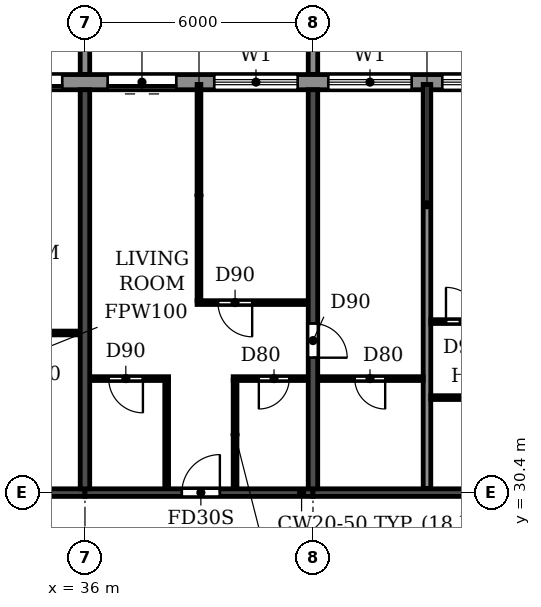
"""IFC4 building model, lengths in metres.
Left out: names, types, materials, properties, quantities, classifications, styles, units other than length and angle.
Written with IfcOpenShell. Run it as: python <this file> out.ifc"""

import sys

from ifc_helpers import new_model, si_unit, direction, frame, frame_2d, origin, place, context, subcontext, project, spatial, polyline, rectangle, outline, extrude, source, transform, mapped, element, fill, save


model = new_model("IFC4")
c1 = context("Model", 3, precision=1e-05, world=origin(), true_north=direction((0.0, 1.0)))
c2 = subcontext(c1, "Body", "Model", "MODEL_VIEW")
j1 = project(units=[si_unit("LENGTHUNIT", "METRE"), si_unit("PLANEANGLEUNIT", "RADIAN")], contexts=[c1])
p1 = place(None, origin())
s1 = spatial("IfcSite", under=j1, at=p1, CompositionType="ELEMENT")
p2 = place(p1, origin())
s2 = spatial("IfcBuilding", under=s1, at=p2, CompositionType="ELEMENT")
p3 = place(p2, frame((0.0, 0.0, 201.6)))
s3 = spatial("IfcBuildingStorey", under=s2, at=p3, CompositionType="ELEMENT", Elevation=201.6)
p4 = place(p3, frame((36.0, 30.5, 0.0), z_axis=(0.0, 0.0, 1.0), x_axis=(0.0, 1.0, 0.0)))
e1 = element("IfcWall", 1, at=p4, inside=s3, PredefinedType="SHEAR", context=c2, shape_type="SweptSolid", body=[
    extrude(rectangle(XDim=10.5, YDim=0.25, at=frame_2d((5.25, 0.0))), origin(), (0.0, 0.0, 1.0), 3.08),
])
p5 = place(p3, frame((42.0, 30.5, 0.0), z_axis=(0.0, 0.0, 1.0), x_axis=(0.0, 1.0, 0.0)))
e2 = element("IfcWall", 2, at=p5, inside=s3, PredefinedType="SHEAR", context=c2, shape_type="SweptSolid", body=[
    extrude(rectangle(XDim=10.5, YDim=0.25, at=frame_2d((5.25, 0.0))), origin(), (0.0, 0.0, 1.0), 3.08),
])
p6 = place(p5, frame((3.45, 0.0, 0.0)))
e3 = element("IfcOpeningElement", 3, at=p6, cuts=e2, PredefinedType="OPENING", context=c2, shape_type="SweptSolid", body=[
    extrude(rectangle(XDim=0.9, YDim=2.1, at=frame_2d((0.45, 1.05))), frame((0.0, 0.135, 0.0), z_axis=(0.0, -1.0, 0.0), x_axis=(1.0, 0.0, 0.0)), (0.0, 0.0, 1.0), 0.27),
])
p7 = place(p3, frame((30.0, 30.4, 0.0), z_axis=(0.0, 0.0, 1.0), x_axis=(1.0, 0.0, 0.0)))
e4 = element("IfcWall", 4, at=p7, inside=s3, PredefinedType="SHEAR", context=c2, shape_type="SweptSolid", body=[
    extrude(rectangle(XDim=6.0, YDim=0.2, at=frame_2d((3.0, 0.0))), origin(), (0.0, 0.0, 1.0), 2.48),
])
p8 = place(p7, frame((2.45, 0.0, 0.0)))
e5 = element("IfcOpeningElement", 5, at=p8, cuts=e4, PredefinedType="OPENING", context=c2, shape_type="SweptSolid", body=[
    extrude(rectangle(XDim=1.0, YDim=2.1, at=frame_2d((0.5, 1.05))), frame((0.0, 0.11, 0.0), z_axis=(0.0, -1.0, 0.0), x_axis=(1.0, 0.0, 0.0)), (0.0, 0.0, 1.0), 0.22),
])
p9 = place(p3, frame((36.0, 30.4, 0.0), z_axis=(0.0, 0.0, 1.0), x_axis=(1.0, 0.0, 0.0)))
e6 = element("IfcWall", 6, at=p9, inside=s3, PredefinedType="SHEAR", context=c2, shape_type="SweptSolid", body=[
    extrude(rectangle(XDim=6.0, YDim=0.2, at=frame_2d((3.0, 0.0))), origin(), (0.0, 0.0, 1.0), 2.48),
])
p10 = place(p9, frame((2.55, 0.0, 0.0)))
e7 = element("IfcOpeningElement", 7, at=p10, cuts=e6, PredefinedType="OPENING", context=c2, shape_type="SweptSolid", body=[
    extrude(rectangle(XDim=1.0, YDim=2.1, at=frame_2d((0.5, 1.05))), frame((0.0, 0.11, 0.0), z_axis=(0.0, -1.0, 0.0), x_axis=(1.0, 0.0, 0.0)), (0.0, 0.0, 1.0), 0.22),
])
p11 = place(p3, frame((42.0, 30.4, 0.0), z_axis=(0.0, 0.0, 1.0), x_axis=(1.0, 0.0, 0.0)))
e8 = element("IfcWall", 8, at=p11, inside=s3, PredefinedType="SHEAR", context=c2, shape_type="SweptSolid", body=[
    extrude(rectangle(XDim=6.0, YDim=0.2, at=frame_2d((3.0, 0.0))), origin(), (0.0, 0.0, 1.0), 2.48),
])
p12 = place(p3, frame((79.317, 41.2, 0.0), z_axis=(0.0, 0.0, 1.0), x_axis=(-1.0, 0.0, 0.0)))
e9 = element("IfcWall", 9, at=p12, inside=s3, PredefinedType="STANDARD", context=c2, shape_type="SweptSolid", body=[
    extrude(rectangle(XDim=56.634, YDim=0.4, at=frame_2d((28.317, 0.0))), origin(), (0.0, 0.0, 1.0), 3.08),
])
p13 = place(p12, frame((52.717, 0.0, 0.9)))
e10 = element("IfcOpeningElement", 10, at=p13, cuts=e9, PredefinedType="OPENING", context=c2, shape_type="SweptSolid", body=[
    extrude(rectangle(XDim=2.2, YDim=1.5, at=frame_2d((1.1, 0.75))), frame((0.0, 0.21, 0.0), z_axis=(0.0, -1.0, 0.0), x_axis=(1.0, 0.0, 0.0)), (0.0, 0.0, 1.0), 0.42),
])
p14 = place(p12, frame((49.917, 0.0, 0.0)))
e11 = element("IfcOpeningElement", 11, at=p14, cuts=e9, PredefinedType="OPENING", context=c2, shape_type="SweptSolid", body=[
    extrude(rectangle(XDim=1.8, YDim=2.4, at=frame_2d((0.9, 1.2))), frame((0.0, 0.21, 0.0), z_axis=(0.0, -1.0, 0.0), x_axis=(1.0, 0.0, 0.0)), (0.0, 0.0, 1.0), 0.42),
])
p15 = place(p12, frame((46.717, 0.0, 0.9)))
e12 = element("IfcOpeningElement", 12, at=p15, cuts=e9, PredefinedType="OPENING", context=c2, shape_type="SweptSolid", body=[
    extrude(rectangle(XDim=2.2, YDim=1.5, at=frame_2d((1.1, 0.75))), frame((0.0, 0.21, 0.0), z_axis=(0.0, -1.0, 0.0), x_axis=(1.0, 0.0, 0.0)), (0.0, 0.0, 1.0), 0.42),
])
p16 = place(p12, frame((43.917, 0.0, 0.0)))
e13 = element("IfcOpeningElement", 13, at=p16, cuts=e9, PredefinedType="OPENING", context=c2, shape_type="SweptSolid", body=[
    extrude(rectangle(XDim=1.8, YDim=2.4, at=frame_2d((0.9, 1.2))), frame((0.0, 0.21, 0.0), z_axis=(0.0, -1.0, 0.0), x_axis=(1.0, 0.0, 0.0)), (0.0, 0.0, 1.0), 0.42),
])
p17 = place(p12, frame((40.917, 0.0, 0.0)))
e14 = element("IfcOpeningElement", 14, at=p17, cuts=e9, PredefinedType="OPENING", context=c2, shape_type="SweptSolid", body=[
    extrude(rectangle(XDim=1.8, YDim=2.4, at=frame_2d((0.9, 1.2))), frame((0.0, 0.21, 0.0), z_axis=(0.0, -1.0, 0.0), x_axis=(1.0, 0.0, 0.0)), (0.0, 0.0, 1.0), 0.42),
])
p18 = place(p12, frame((37.717, 0.0, 0.9)))
e15 = element("IfcOpeningElement", 15, at=p18, cuts=e9, PredefinedType="OPENING", context=c2, shape_type="SweptSolid", body=[
    extrude(rectangle(XDim=2.2, YDim=1.5, at=frame_2d((1.1, 0.75))), frame((0.0, 0.21, 0.0), z_axis=(0.0, -1.0, 0.0), x_axis=(1.0, 0.0, 0.0)), (0.0, 0.0, 1.0), 0.42),
])
p19 = place(p12, frame((34.717, 0.0, 0.9)))
e16 = element("IfcOpeningElement", 16, at=p19, cuts=e9, PredefinedType="OPENING", context=c2, shape_type="SweptSolid", body=[
    extrude(rectangle(XDim=2.2, YDim=1.5, at=frame_2d((1.1, 0.75))), frame((0.0, 0.21, 0.0), z_axis=(0.0, -1.0, 0.0), x_axis=(1.0, 0.0, 0.0)), (0.0, 0.0, 1.0), 0.42),
])
p20 = place(p12, frame((31.717, 0.0, 0.9)))
e17 = element("IfcOpeningElement", 17, at=p20, cuts=e9, PredefinedType="OPENING", context=c2, shape_type="SweptSolid", body=[
    extrude(rectangle(XDim=2.2, YDim=1.5, at=frame_2d((1.1, 0.75))), frame((0.0, 0.21, 0.0), z_axis=(0.0, -1.0, 0.0), x_axis=(1.0, 0.0, 0.0)), (0.0, 0.0, 1.0), 0.42),
])
p21 = place(p12, frame((28.717, 0.0, 0.9)))
e18 = element("IfcOpeningElement", 18, at=p21, cuts=e9, PredefinedType="OPENING", context=c2, shape_type="SweptSolid", body=[
    extrude(rectangle(XDim=2.2, YDim=1.5, at=frame_2d((1.1, 0.75))), frame((0.0, 0.21, 0.0), z_axis=(0.0, -1.0, 0.0), x_axis=(1.0, 0.0, 0.0)), (0.0, 0.0, 1.0), 0.42),
])
p22 = place(p12, frame((25.917, 0.0, 0.0)))
e19 = element("IfcOpeningElement", 19, at=p22, cuts=e9, PredefinedType="OPENING", context=c2, shape_type="SweptSolid", body=[
    extrude(rectangle(XDim=1.8, YDim=2.4, at=frame_2d((0.9, 1.2))), frame((0.0, 0.21, 0.0), z_axis=(0.0, -1.0, 0.0), x_axis=(1.0, 0.0, 0.0)), (0.0, 0.0, 1.0), 0.42),
])
p23 = place(p12, frame((22.717, 0.0, 0.9)))
e20 = element("IfcOpeningElement", 20, at=p23, cuts=e9, PredefinedType="OPENING", context=c2, shape_type="SweptSolid", body=[
    extrude(rectangle(XDim=2.2, YDim=1.5, at=frame_2d((1.1, 0.75))), frame((0.0, 0.21, 0.0), z_axis=(0.0, -1.0, 0.0), x_axis=(1.0, 0.0, 0.0)), (0.0, 0.0, 1.0), 0.42),
])
p24 = place(p12, frame((19.717, 0.0, 0.9)))
e21 = element("IfcOpeningElement", 21, at=p24, cuts=e9, PredefinedType="OPENING", context=c2, shape_type="SweptSolid", body=[
    extrude(rectangle(XDim=2.2, YDim=1.5, at=frame_2d((1.1, 0.75))), frame((0.0, 0.21, 0.0), z_axis=(0.0, -1.0, 0.0), x_axis=(1.0, 0.0, 0.0)), (0.0, 0.0, 1.0), 0.42),
])
p25 = place(p12, frame((16.917, 0.0, 0.0)))
e22 = element("IfcOpeningElement", 22, at=p25, cuts=e9, PredefinedType="OPENING", context=c2, shape_type="SweptSolid", body=[
    extrude(rectangle(XDim=1.8, YDim=2.4, at=frame_2d((0.9, 1.2))), frame((0.0, 0.21, 0.0), z_axis=(0.0, -1.0, 0.0), x_axis=(1.0, 0.0, 0.0)), (0.0, 0.0, 1.0), 0.42),
])
p26 = place(p12, frame((13.717, 0.0, 0.9)))
e23 = element("IfcOpeningElement", 23, at=p26, cuts=e9, PredefinedType="OPENING", context=c2, shape_type="SweptSolid", body=[
    extrude(rectangle(XDim=2.2, YDim=1.5, at=frame_2d((1.1, 0.75))), frame((0.0, 0.21, 0.0), z_axis=(0.0, -1.0, 0.0), x_axis=(1.0, 0.0, 0.0)), (0.0, 0.0, 1.0), 0.42),
])
p27 = place(p12, frame((10.717, 0.0, 0.9)))
e24 = element("IfcOpeningElement", 24, at=p27, cuts=e9, PredefinedType="OPENING", context=c2, shape_type="SweptSolid", body=[
    extrude(rectangle(XDim=2.2, YDim=1.5, at=frame_2d((1.1, 0.75))), frame((0.0, 0.21, 0.0), z_axis=(0.0, -1.0, 0.0), x_axis=(1.0, 0.0, 0.0)), (0.0, 0.0, 1.0), 0.42),
])
p28 = place(p12, frame((7.717, 0.0, 0.9)))
e25 = element("IfcOpeningElement", 25, at=p28, cuts=e9, PredefinedType="OPENING", context=c2, shape_type="SweptSolid", body=[
    extrude(rectangle(XDim=2.2, YDim=1.5, at=frame_2d((1.1, 0.75))), frame((0.0, 0.21, 0.0), z_axis=(0.0, -1.0, 0.0), x_axis=(1.0, 0.0, 0.0)), (0.0, 0.0, 1.0), 0.42),
])
p29 = place(p12, frame((4.917, 0.0, 0.0)))
e26 = element("IfcOpeningElement", 26, at=p29, cuts=e9, PredefinedType="OPENING", context=c2, shape_type="SweptSolid", body=[
    extrude(rectangle(XDim=1.8, YDim=2.4, at=frame_2d((0.9, 1.2))), frame((0.0, 0.21, 0.0), z_axis=(0.0, -1.0, 0.0), x_axis=(1.0, 0.0, 0.0)), (0.0, 0.0, 1.0), 0.42),
])
p30 = place(p12, frame((1.717, 0.0, 0.9)))
e27 = element("IfcOpeningElement", 27, at=p30, cuts=e9, PredefinedType="OPENING", context=c2, shape_type="SweptSolid", body=[
    extrude(rectangle(XDim=2.2, YDim=1.5, at=frame_2d((1.1, 0.75))), frame((0.0, 0.21, 0.0), z_axis=(0.0, -1.0, 0.0), x_axis=(1.0, 0.0, 0.0)), (0.0, 0.0, 1.0), 0.42),
])
m1 = source(origin(), c2, "Body", "SweptSolid", [
    extrude(outline(polyline([(0.0, 0.0), (0.25, 0.0), (0.25, 3.1), (0.0, 3.1), (0.0, 0.0)])), origin(), (0.0, 0.0, 1.0), 3.1),
])
for number, where in (
    (28, (35.875, 41.4, 0.0)),
    (29, (41.875, 41.4, 0.0)),
):
    element("IfcWall", number, at=place(p3, frame(where)), inside=s3, PredefinedType="STANDARD", context=c2, shape_type="MappedRepresentation", body=[
        mapped(m1, transform((0.0, 0.0, 0.0))),
    ])
p31 = place(p3, frame((45.0, 30.51, 0.0), z_axis=(0.0, 0.0, 1.0), x_axis=(0.0, 1.0, 0.0)))
e30 = element("IfcWall", 30, at=p31, inside=s3, PredefinedType="PARTITIONING", context=c2, shape_type="SweptSolid", body=[
    extrude(rectangle(XDim=10.63, YDim=0.2, at=frame_2d((5.315, 0.0))), origin(), (0.0, 0.0, 1.0), 3.08),
])
p32 = place(p3, frame((45.1, 32.9, 0.0), z_axis=(0.0, 0.0, 1.0), x_axis=(1.0, 0.0, 0.0)))
e31 = element("IfcWall", 31, at=p32, inside=s3, PredefinedType="PARTITIONING", context=c2, shape_type="SweptSolid", body=[
    extrude(rectangle(XDim=2.765, YDim=0.1, at=frame_2d((1.382, 0.0))), origin(), (0.0, 0.0, 1.0), 3.08),
])
p33 = place(p32, frame((1.0, 0.0, 0.0)))
e32 = element("IfcOpeningElement", 32, at=p33, cuts=e31, PredefinedType="OPENING", context=c2, shape_type="SweptSolid", body=[
    extrude(rectangle(XDim=0.8, YDim=2.1, at=frame_2d((0.4, 1.05))), frame((0.0, 0.06, 0.0), z_axis=(0.0, -1.0, 0.0), x_axis=(1.0, 0.0, 0.0)), (0.0, 0.0, 1.0), 0.12),
])
p34 = place(p3, frame((36.135, 33.4, 0.0), z_axis=(0.0, 0.0, 1.0), x_axis=(1.0, 0.0, 0.0)))
e33 = element("IfcWall", 33, at=p34, inside=s3, PredefinedType="PARTITIONING", context=c2, shape_type="SweptSolid", body=[
    extrude(rectangle(XDim=2.065, YDim=0.1, at=frame_2d((1.032, 0.0))), origin(), (0.0, 0.0, 1.0), 3.08),
])
p35 = place(p34, frame((0.49, 0.0, 0.0)))
e34 = element("IfcOpeningElement", 34, at=p35, cuts=e33, PredefinedType="OPENING", context=c2, shape_type="SweptSolid", body=[
    extrude(rectangle(XDim=0.9, YDim=2.1, at=frame_2d((0.45, 1.05))), frame((0.0, 0.06, 0.0), z_axis=(0.0, -1.0, 0.0), x_axis=(1.0, 0.0, 0.0)), (0.0, 0.0, 1.0), 0.12),
])
p36 = place(p3, frame((39.9, 33.4, 0.0), z_axis=(0.0, 0.0, 1.0), x_axis=(1.0, 0.0, 0.0)))
e35 = element("IfcWall", 35, at=p36, inside=s3, PredefinedType="PARTITIONING", context=c2, shape_type="SweptSolid", body=[
    extrude(rectangle(XDim=1.965, YDim=0.1, at=frame_2d((0.982, 0.0))), origin(), (0.0, 0.0, 1.0), 3.08),
])
p37 = place(p36, frame((0.675, 0.0, 0.0)))
e36 = element("IfcOpeningElement", 36, at=p37, cuts=e35, PredefinedType="OPENING", context=c2, shape_type="SweptSolid", body=[
    extrude(rectangle(XDim=0.8, YDim=2.1, at=frame_2d((0.4, 1.05))), frame((0.0, 0.06, 0.0), z_axis=(0.0, -1.0, 0.0), x_axis=(1.0, 0.0, 0.0)), (0.0, 0.0, 1.0), 0.12),
])
p38 = place(p3, frame((42.135, 33.4, 0.0), z_axis=(0.0, 0.0, 1.0), x_axis=(1.0, 0.0, 0.0)))
e37 = element("IfcWall", 37, at=p38, inside=s3, PredefinedType="PARTITIONING", context=c2, shape_type="SweptSolid", body=[
    extrude(rectangle(XDim=2.765, YDim=0.1, at=frame_2d((1.382, 0.0))), origin(), (0.0, 0.0, 1.0), 3.08),
])
p39 = place(p38, frame((0.965, 0.0, 0.0)))
e38 = element("IfcOpeningElement", 38, at=p39, cuts=e37, PredefinedType="OPENING", context=c2, shape_type="SweptSolid", body=[
    extrude(rectangle(XDim=0.8, YDim=2.1, at=frame_2d((0.4, 1.05))), frame((0.0, 0.06, 0.0), z_axis=(0.0, -1.0, 0.0), x_axis=(1.0, 0.0, 0.0)), (0.0, 0.0, 1.0), 0.12),
])
p40 = place(p3, frame((33.8, 34.6, 0.0), z_axis=(0.0, 0.0, 1.0), x_axis=(1.0, 0.0, 0.0)))
e39 = element("IfcWall", 39, at=p40, inside=s3, PredefinedType="PARTITIONING", context=c2, shape_type="SweptSolid", body=[
    extrude(rectangle(XDim=2.065, YDim=0.1, at=frame_2d((1.032, 0.0))), origin(), (0.0, 0.0, 1.0), 3.08),
])
p41 = place(p3, frame((45.1, 34.9, 0.0), z_axis=(0.0, 0.0, 1.0), x_axis=(1.0, 0.0, 0.0)))
e40 = element("IfcWall", 40, at=p41, inside=s3, PredefinedType="PARTITIONING", context=c2, shape_type="SweptSolid", body=[
    extrude(rectangle(XDim=2.765, YDim=0.1, at=frame_2d((1.382, 0.0))), origin(), (0.0, 0.0, 1.0), 3.08),
])
p42 = place(p41, frame((0.4, 0.0, 0.0)))
e41 = element("IfcOpeningElement", 41, at=p42, cuts=e40, PredefinedType="OPENING", context=c2, shape_type="SweptSolid", body=[
    extrude(rectangle(XDim=0.9, YDim=2.1, at=frame_2d((0.45, 1.05))), frame((0.0, 0.06, 0.0), z_axis=(0.0, -1.0, 0.0), x_axis=(1.0, 0.0, 0.0)), (0.0, 0.0, 1.0), 0.12),
])
p43 = place(p3, frame((38.95, 35.4, 0.0), z_axis=(0.0, 0.0, 1.0), x_axis=(1.0, 0.0, 0.0)))
e42 = element("IfcWall", 42, at=p43, inside=s3, PredefinedType="PARTITIONING", context=c2, shape_type="SweptSolid", body=[
    extrude(rectangle(XDim=2.915, YDim=0.1, at=frame_2d((1.458, 0.0))), origin(), (0.0, 0.0, 1.0), 3.08),
])
p44 = place(p43, frame((0.55, 0.0, 0.0)))
e43 = element("IfcOpeningElement", 43, at=p44, cuts=e42, PredefinedType="OPENING", context=c2, shape_type="SweptSolid", body=[
    extrude(rectangle(XDim=0.9, YDim=2.1, at=frame_2d((0.45, 1.05))), frame((0.0, 0.06, 0.0), z_axis=(0.0, -1.0, 0.0), x_axis=(1.0, 0.0, 0.0)), (0.0, 0.0, 1.0), 0.12),
])
p45 = place(p3, frame((38.15, 30.51, 0.0), z_axis=(0.0, 0.0, 1.0), x_axis=(0.0, 1.0, 0.0)))
e44 = element("IfcWall", 44, at=p45, inside=s3, PredefinedType="PARTITIONING", context=c2, shape_type="SweptSolid", body=[
    extrude(rectangle(XDim=2.84, YDim=0.1, at=frame_2d((1.42, 0.0))), origin(), (0.0, 0.0, 1.0), 3.08),
])
p46 = place(p3, frame((39.0, 35.45, 0.0), z_axis=(0.0, 0.0, 1.0), x_axis=(0.0, 1.0, 0.0)))
e45 = element("IfcWall", 45, at=p46, inside=s3, PredefinedType="PARTITIONING", context=c2, shape_type="SweptSolid", body=[
    extrude(rectangle(XDim=5.69, YDim=0.1, at=frame_2d((2.845, 0.0))), origin(), (0.0, 0.0, 1.0), 3.08),
])
p47 = place(p3, frame((39.95, 30.51, 0.0), z_axis=(0.0, 0.0, 1.0), x_axis=(0.0, 1.0, 0.0)))
e46 = element("IfcWall", 46, at=p47, inside=s3, PredefinedType="PARTITIONING", context=c2, shape_type="SweptSolid", body=[
    extrude(rectangle(XDim=2.84, YDim=0.1, at=frame_2d((1.42, 0.0))), origin(), (0.0, 0.0, 1.0), 3.08),
])
p48 = place(p16, origin())
e47 = element("IfcDoor", 47, at=p48, inside=s3, OperationType="DOUBLE_DOOR_SLIDING", PredefinedType="DOOR", context=c2, shape_type="SweptSolid", body=[
    extrude(rectangle(XDim=1.8, YDim=2.4, at=frame_2d((0.9, 1.2))), frame((0.0, 0.025, 0.0), z_axis=(0.0, -1.0, 0.0), x_axis=(1.0, 0.0, 0.0)), (0.0, 0.0, 1.0), 0.05),
])
fill(e13, e47)
p49 = place(p17, origin())
e48 = element("IfcDoor", 48, at=p49, inside=s3, OperationType="DOUBLE_DOOR_SLIDING", PredefinedType="DOOR", context=c2, shape_type="SweptSolid", body=[
    extrude(rectangle(XDim=1.8, YDim=2.4, at=frame_2d((0.9, 1.2))), frame((0.0, 0.025, 0.0), z_axis=(0.0, -1.0, 0.0), x_axis=(1.0, 0.0, 0.0)), (0.0, 0.0, 1.0), 0.05),
])
fill(e14, e48)
p50 = place(p18, origin())
e49 = element("IfcWindow", 49, at=p50, inside=s3, PartitioningType="DOUBLE_PANEL_HORIZONTAL", PredefinedType="WINDOW", context=c2, shape_type="SweptSolid", body=[
    extrude(rectangle(XDim=2.2, YDim=1.5, at=frame_2d((1.1, 0.75))), frame((0.0, 0.03, 0.0), z_axis=(0.0, -1.0, 0.0), x_axis=(1.0, 0.0, 0.0)), (0.0, 0.0, 1.0), 0.06),
])
fill(e15, e49)
p51 = place(p19, origin())
e50 = element("IfcWindow", 50, at=p51, inside=s3, PartitioningType="DOUBLE_PANEL_HORIZONTAL", PredefinedType="WINDOW", context=c2, shape_type="SweptSolid", body=[
    extrude(rectangle(XDim=2.2, YDim=1.5, at=frame_2d((1.1, 0.75))), frame((0.0, 0.03, 0.0), z_axis=(0.0, -1.0, 0.0), x_axis=(1.0, 0.0, 0.0)), (0.0, 0.0, 1.0), 0.06),
])
fill(e16, e50)
p52 = place(p20, origin())
e51 = element("IfcWindow", 51, at=p52, inside=s3, PartitioningType="DOUBLE_PANEL_HORIZONTAL", PredefinedType="WINDOW", context=c2, shape_type="SweptSolid", body=[
    extrude(rectangle(XDim=2.2, YDim=1.5, at=frame_2d((1.1, 0.75))), frame((0.0, 0.03, 0.0), z_axis=(0.0, -1.0, 0.0), x_axis=(1.0, 0.0, 0.0)), (0.0, 0.0, 1.0), 0.06),
])
fill(e17, e51)
p53 = place(p39, frame((0.8, 0.0, 0.0), z_axis=(0.0, 0.0, 1.0), x_axis=(-1.0, 0.0, 0.0)))
e52 = element("IfcDoor", 52, at=p53, inside=s3, OperationType="SINGLE_SWING_LEFT", PredefinedType="DOOR", context=c2, shape_type="SweptSolid", body=[
    extrude(rectangle(XDim=0.8, YDim=2.1, at=frame_2d((0.4, 1.05))), frame((0.0, 0.025, 0.0), z_axis=(0.0, -1.0, 0.0), x_axis=(1.0, 0.0, 0.0)), (0.0, 0.0, 1.0), 0.05),
])
fill(e38, e52)
p54 = place(p35, frame((0.9, 0.0, 0.0), z_axis=(0.0, 0.0, 1.0), x_axis=(-1.0, 0.0, 0.0)))
e53 = element("IfcDoor", 53, at=p54, inside=s3, OperationType="SINGLE_SWING_LEFT", PredefinedType="DOOR", context=c2, shape_type="SweptSolid", body=[
    extrude(rectangle(XDim=0.9, YDim=2.1, at=frame_2d((0.45, 1.05))), frame((0.0, 0.025, 0.0), z_axis=(0.0, -1.0, 0.0), x_axis=(1.0, 0.0, 0.0)), (0.0, 0.0, 1.0), 0.05),
])
fill(e34, e53)
p55 = place(p10, origin())
e54 = element("IfcDoor", 54, at=p55, inside=s3, OperationType="SINGLE_SWING_RIGHT", PredefinedType="DOOR", context=c2, shape_type="SweptSolid", body=[
    extrude(rectangle(XDim=1.0, YDim=2.1, at=frame_2d((0.5, 1.05))), frame((0.0, 0.025, 0.0), z_axis=(0.0, -1.0, 0.0), x_axis=(1.0, 0.0, 0.0)), (0.0, 0.0, 1.0), 0.05),
])
fill(e7, e54)
p56 = place(p44, frame((0.9, 0.0, 0.0), z_axis=(0.0, 0.0, 1.0), x_axis=(-1.0, 0.0, 0.0)))
e55 = element("IfcDoor", 55, at=p56, inside=s3, OperationType="SINGLE_SWING_LEFT", PredefinedType="DOOR", context=c2, shape_type="SweptSolid", body=[
    extrude(rectangle(XDim=0.9, YDim=2.1, at=frame_2d((0.45, 1.05))), frame((0.0, 0.025, 0.0), z_axis=(0.0, -1.0, 0.0), x_axis=(1.0, 0.0, 0.0)), (0.0, 0.0, 1.0), 0.05),
])
fill(e43, e55)
p57 = place(p37, frame((0.8, 0.0, 0.0), z_axis=(0.0, 0.0, 1.0), x_axis=(-1.0, 0.0, 0.0)))
e56 = element("IfcDoor", 56, at=p57, inside=s3, OperationType="SINGLE_SWING_RIGHT", PredefinedType="DOOR", context=c2, shape_type="SweptSolid", body=[
    extrude(rectangle(XDim=0.8, YDim=2.1, at=frame_2d((0.4, 1.05))), frame((0.0, 0.025, 0.0), z_axis=(0.0, -1.0, 0.0), x_axis=(1.0, 0.0, 0.0)), (0.0, 0.0, 1.0), 0.05),
])
fill(e36, e56)
p58 = place(p6, frame((0.9, 0.0, 0.0), z_axis=(0.0, 0.0, 1.0), x_axis=(-1.0, 0.0, 0.0)))
e57 = element("IfcDoor", 57, at=p58, inside=s3, OperationType="SINGLE_SWING_RIGHT", PredefinedType="DOOR", context=c2, shape_type="SweptSolid", body=[
    extrude(rectangle(XDim=0.9, YDim=2.1, at=frame_2d((0.45, 1.05))), frame((0.0, 0.025, 0.0), z_axis=(0.0, -1.0, 0.0), x_axis=(1.0, 0.0, 0.0)), (0.0, 0.0, 1.0), 0.05),
])
fill(e3, e57)
p59 = place(p42, origin())
e58 = element("IfcDoor", 58, at=p59, inside=s3, OperationType="SINGLE_SWING_LEFT", PredefinedType="DOOR", context=c2, shape_type="SweptSolid", body=[
    extrude(rectangle(XDim=0.9, YDim=2.1, at=frame_2d((0.45, 1.05))), frame((0.0, 0.025, 0.0), z_axis=(0.0, -1.0, 0.0), x_axis=(1.0, 0.0, 0.0)), (0.0, 0.0, 1.0), 0.05),
])
fill(e41, e58)
save(model, sys.argv[1])
